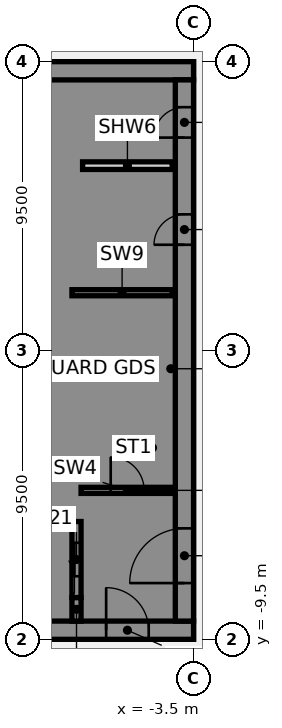
"""IFC4 building model, lengths in metres.
Left out: names, types, materials, properties, quantities, classifications, styles, units other than length and angle.
Written with IfcOpenShell. Run it as: python <this file> out.ifc"""

import sys

from ifc_helpers import new_model, si_unit, direction, frame, frame_2d, origin, place, context, subcontext, project, spatial, polyline, rectangle, outline, extrude, element, fill, save


model = new_model("IFC4")
c1 = context("Model", 3, precision=1e-05, world=origin(), true_north=direction((0.0, 1.0)))
c2 = subcontext(c1, "Body", "Model", "MODEL_VIEW")
j1 = project(units=[si_unit("LENGTHUNIT", "METRE"), si_unit("PLANEANGLEUNIT", "RADIAN")], contexts=[c1])
p1 = place(None, origin())
s1 = spatial("IfcSite", under=j1, at=p1, CompositionType="ELEMENT")
p2 = place(p1, origin())
s2 = spatial("IfcBuilding", under=s1, at=p2, CompositionType="ELEMENT")
p3 = place(p2, frame((0.0, 0.0, 91.0)))
s3 = spatial("IfcBuildingStorey", under=s2, at=p3, CompositionType="ELEMENT", Elevation=91.0)
p4 = place(p3, frame((-16.5, -9.2, 0.0), z_axis=(0.0, 0.0, 1.0), x_axis=(1.0, 0.0, 0.0)))
e1 = element("IfcWall", 1, at=p4, inside=s3, PredefinedType="SHEAR", context=c2, shape_type="SweptSolid", body=[
    extrude(rectangle(XDim=13.0, YDim=0.6, at=frame_2d((6.5, 0.0))), origin(), (0.0, 0.0, 1.0), 3.61),
])
p5 = place(p4, frame((4.15, 0.0, 0.0)))
e2 = element("IfcOpeningElement", 2, at=p5, cuts=e1, PredefinedType="OPENING", context=c2, shape_type="SweptSolid", body=[
    extrude(rectangle(XDim=1.4, YDim=2.1, at=frame_2d((0.7, 1.05))), frame((0.0, 0.31, 0.0), z_axis=(0.0, -1.0, 0.0), x_axis=(1.0, 0.0, 0.0)), (0.0, 0.0, 1.0), 0.62),
])
p6 = place(p4, frame((10.125, 0.0, 0.0)))
e3 = element("IfcOpeningElement", 3, at=p6, cuts=e1, PredefinedType="OPENING", context=c2, shape_type="SweptSolid", body=[
    extrude(rectangle(XDim=1.4, YDim=2.1, at=frame_2d((0.7, 1.05))), frame((0.0, 0.31, 0.0), z_axis=(0.0, -1.0, 0.0), x_axis=(1.0, 0.0, 0.0)), (0.0, 0.0, 1.0), 0.62),
])
p7 = place(p3, frame((-16.5, 9.2, 0.0), z_axis=(0.0, 0.0, 1.0), x_axis=(1.0, 0.0, 0.0)))
e4 = element("IfcWall", 4, at=p7, inside=s3, PredefinedType="SHEAR", context=c2, shape_type="SweptSolid", body=[
    extrude(rectangle(XDim=13.0, YDim=0.6, at=frame_2d((6.5, 0.0))), origin(), (0.0, 0.0, 1.0), 3.61),
])
p8 = place(p3, origin())
e5 = element("IfcWall", 5, at=p8, inside=s3, PredefinedType="SHEAR", context=c2, shape_type="SweptSolid", body=[
    extrude(outline(polyline([(-9.8, -5.375), (-9.8, -5.625), (-7.5, -5.625), (-7.2, -5.625), (-7.2, 8.9), (-7.5, 8.9), (-9.8, 8.9), (-9.8, 8.125), (-7.5, 8.125), (-7.5, 5.625), (-9.8, 5.625), (-9.8, 5.375), (-7.5, 5.375), (-7.5, 2.875), (-9.8, 2.875), (-9.8, 2.625), (-7.5, 2.625), (-7.5, 0.125), (-9.8, 0.125), (-9.8, -0.125), (-7.5, -0.125), (-7.5, -2.625), (-9.8, -2.625), (-9.8, -2.875), (-7.5, -2.875), (-7.5, -5.375), (-9.8, -5.375)])), origin(), (0.0, 0.0, 1.0), 3.61),
])
p9 = place(p3, origin())
e6 = element("IfcWall", 6, at=p9, inside=s3, PredefinedType="SHEAR", context=c2, shape_type="SweptSolid", body=[
    extrude(outline(polyline([(-7.5, -8.125), (-9.55, -8.125), (-9.55, -5.625), (-9.8, -5.625), (-9.8, -8.125), (-9.8, -8.9), (-7.5, -8.9), (-7.5, -8.125)])), origin(), (0.0, 0.0, 1.0), 3.61),
])
p10 = place(p3, frame((-7.35, -8.9, 0.0), z_axis=(0.0, 0.0, 1.0), x_axis=(0.0, 1.0, 0.0)))
e7 = element("IfcWall", 7, at=p10, inside=s3, PredefinedType="SHEAR", context=c2, shape_type="SweptSolid", body=[
    extrude(rectangle(XDim=0.775, YDim=0.3, at=frame_2d((0.387, 0.0))), origin(), (0.0, 0.0, 1.0), 3.61),
])
p11 = place(p3, frame((-7.5, 1.9, 0.0), z_axis=(0.0, 0.0, 1.0), x_axis=(1.0, 0.0, 0.0)))
e8 = element("IfcWall", 8, at=p11, inside=s3, PredefinedType="SHEAR", context=c2, shape_type="SweptSolid", body=[
    extrude(rectangle(XDim=3.3, YDim=0.2, at=frame_2d((1.65, 0.0))), origin(), (0.0, 0.0, 1.0), 3.61),
])
p12 = place(p3, frame((-7.35, -8.125, 0.0), z_axis=(0.0, 0.0, 1.0), x_axis=(0.0, 1.0, 0.0)))
e9 = element("IfcWall", 9, at=p12, inside=s3, PredefinedType="SHEAR", context=c2, shape_type="SweptSolid", body=[
    extrude(rectangle(XDim=2.5, YDim=0.3, at=frame_2d((1.25, 0.0))), origin(), (0.0, 0.0, 1.0), 3.61),
])
p13 = place(p12, frame((0.7, 0.0, 0.0)))
e10 = element("IfcOpeningElement", 10, at=p13, cuts=e9, PredefinedType="OPENING", context=c2, shape_type="SweptSolid", body=[
    extrude(rectangle(XDim=1.1, YDim=2.1, at=frame_2d((0.55, 1.05))), frame((0.0, 0.16, 0.0), z_axis=(0.0, -1.0, 0.0), x_axis=(1.0, 0.0, 0.0)), (0.0, 0.0, 1.0), 0.32),
])
p14 = place(p3, frame((-3.8, -8.9, 0.0), z_axis=(0.0, 0.0, 1.0), x_axis=(0.0, 1.0, 0.0)))
e11 = element("IfcWall", 11, at=p14, inside=s3, PredefinedType="SHEAR", context=c2, shape_type="SweptSolid", body=[
    extrude(rectangle(XDim=17.8, YDim=0.6, at=frame_2d((8.9, 0.0))), origin(), (0.0, 0.0, 1.0), 3.61),
])
p15 = place(p14, frame((1.25, 0.0, 0.0)))
e12 = element("IfcOpeningElement", 12, at=p15, cuts=e11, PredefinedType="OPENING", context=c2, shape_type="SweptSolid", body=[
    extrude(rectangle(XDim=1.8, YDim=2.1, at=frame_2d((0.9, 1.05))), frame((0.0, 0.31, 0.0), z_axis=(0.0, -1.0, 0.0), x_axis=(1.0, 0.0, 0.0)), (0.0, 0.0, 1.0), 0.62),
])
p16 = place(p14, frame((12.377, 0.0, 0.0)))
e13 = element("IfcOpeningElement", 13, at=p16, cuts=e11, PredefinedType="OPENING", context=c2, shape_type="SweptSolid", body=[
    extrude(rectangle(XDim=1.0, YDim=2.1, at=frame_2d((0.5, 1.05))), frame((0.0, 0.31, 0.0), z_axis=(0.0, -1.0, 0.0), x_axis=(1.0, 0.0, 0.0)), (0.0, 0.0, 1.0), 0.62),
])
p17 = place(p14, frame((15.903, 0.0, 0.0)))
e14 = element("IfcOpeningElement", 14, at=p17, cuts=e11, PredefinedType="OPENING", context=c2, shape_type="SweptSolid", body=[
    extrude(rectangle(XDim=1.0, YDim=2.1, at=frame_2d((0.5, 1.05))), frame((0.0, 0.31, 0.0), z_axis=(0.0, -1.0, 0.0), x_axis=(1.0, 0.0, 0.0)), (0.0, 0.0, 1.0), 0.62),
])
p18 = place(p3, frame((-7.15, 6.08, 0.0), z_axis=(0.0, 0.0, 1.0), x_axis=(1.0, 0.0, 0.0)))
e15 = element("IfcWall", 15, at=p18, inside=s3, PredefinedType="PARTITIONING", context=c2, shape_type="SweptSolid", body=[
    extrude(rectangle(XDim=2.95, YDim=0.25, at=frame_2d((1.475, 0.0))), origin(), (0.0, 0.0, 1.0), 3.61),
])
p19 = place(p3, frame((-7.2, -4.6, 0.0), z_axis=(0.0, 0.0, 1.0), x_axis=(1.0, 0.0, 0.0)))
e16 = element("IfcWall", 16, at=p19, inside=s3, PredefinedType="SHEAR", context=c2, shape_type="SweptSolid", body=[
    extrude(rectangle(XDim=3.1, YDim=0.2, at=frame_2d((1.55, 0.0))), origin(), (0.0, 0.0, 1.0), 3.61),
])
p20 = place(p19, frame((0.975, 0.0, 0.0)))
e17 = element("IfcOpeningElement", 17, at=p20, cuts=e16, PredefinedType="OPENING", context=c2, shape_type="SweptSolid", body=[
    extrude(rectangle(XDim=1.1, YDim=2.1, at=frame_2d((0.55, 1.05))), frame((0.0, 0.11, 0.0), z_axis=(0.0, -1.0, 0.0), x_axis=(1.0, 0.0, 0.0)), (0.0, 0.0, 1.0), 0.22),
])
p21 = place(p6, origin())
e18 = element("IfcDoor", 18, at=p21, inside=s3, OperationType="SINGLE_SWING_LEFT", PredefinedType="DOOR", context=c2, shape_type="SweptSolid", body=[
    extrude(rectangle(XDim=1.4, YDim=2.1, at=frame_2d((0.7, 1.05))), frame((0.0, 0.025, 0.0), z_axis=(0.0, -1.0, 0.0), x_axis=(1.0, 0.0, 0.0)), (0.0, 0.0, 1.0), 0.05),
])
fill(e3, e18)
p22 = place(p15, origin())
e19 = element("IfcDoor", 19, at=p22, inside=s3, OperationType="SINGLE_SWING_LEFT", PredefinedType="DOOR", context=c2, shape_type="SweptSolid", body=[
    extrude(rectangle(XDim=1.8, YDim=2.1, at=frame_2d((0.9, 1.05))), frame((0.0, 0.025, 0.0), z_axis=(0.0, -1.0, 0.0), x_axis=(1.0, 0.0, 0.0)), (0.0, 0.0, 1.0), 0.05),
])
fill(e12, e19)
p23 = place(p16, origin())
e20 = element("IfcDoor", 20, at=p23, inside=s3, OperationType="SINGLE_SWING_LEFT", PredefinedType="DOOR", context=c2, shape_type="SweptSolid", body=[
    extrude(rectangle(XDim=1.0, YDim=2.1, at=frame_2d((0.5, 1.05))), frame((0.0, 0.275, 0.0), z_axis=(0.0, -1.0, 0.0), x_axis=(1.0, 0.0, 0.0)), (0.0, 0.0, 1.0), 0.05),
])
fill(e13, e20)
p24 = place(p17, origin())
e21 = element("IfcDoor", 21, at=p24, inside=s3, OperationType="SINGLE_SWING_LEFT", PredefinedType="DOOR", context=c2, shape_type="SweptSolid", body=[
    extrude(rectangle(XDim=1.0, YDim=2.1, at=frame_2d((0.5, 1.05))), frame((0.0, 0.275, 0.0), z_axis=(0.0, -1.0, 0.0), x_axis=(1.0, 0.0, 0.0)), (0.0, 0.0, 1.0), 0.05),
])
fill(e14, e21)
p25 = place(p20, origin())
e22 = element("IfcDoor", 22, at=p25, inside=s3, OperationType="SINGLE_SWING_LEFT", PredefinedType="DOOR", context=c2, shape_type="SweptSolid", body=[
    extrude(rectangle(XDim=1.1, YDim=2.1, at=frame_2d((0.55, 1.05))), frame((0.0, 0.025, 0.0), z_axis=(0.0, -1.0, 0.0), x_axis=(1.0, 0.0, 0.0)), (0.0, 0.0, 1.0), 0.05),
])
fill(e17, e22)
p26 = place(p13, origin())
e23 = element("IfcDoor", 23, at=p26, inside=s3, OperationType="SLIDING_TO_LEFT", PredefinedType="DOOR", context=c2, shape_type="SweptSolid", body=[
    extrude(rectangle(XDim=1.1, YDim=2.1, at=frame_2d((0.55, 1.05))), frame((0.0, 0.025, 0.0), z_axis=(0.0, -1.0, 0.0), x_axis=(1.0, 0.0, 0.0)), (0.0, 0.0, 1.0), 0.05),
])
fill(e10, e23)
save(model, sys.argv[1])
